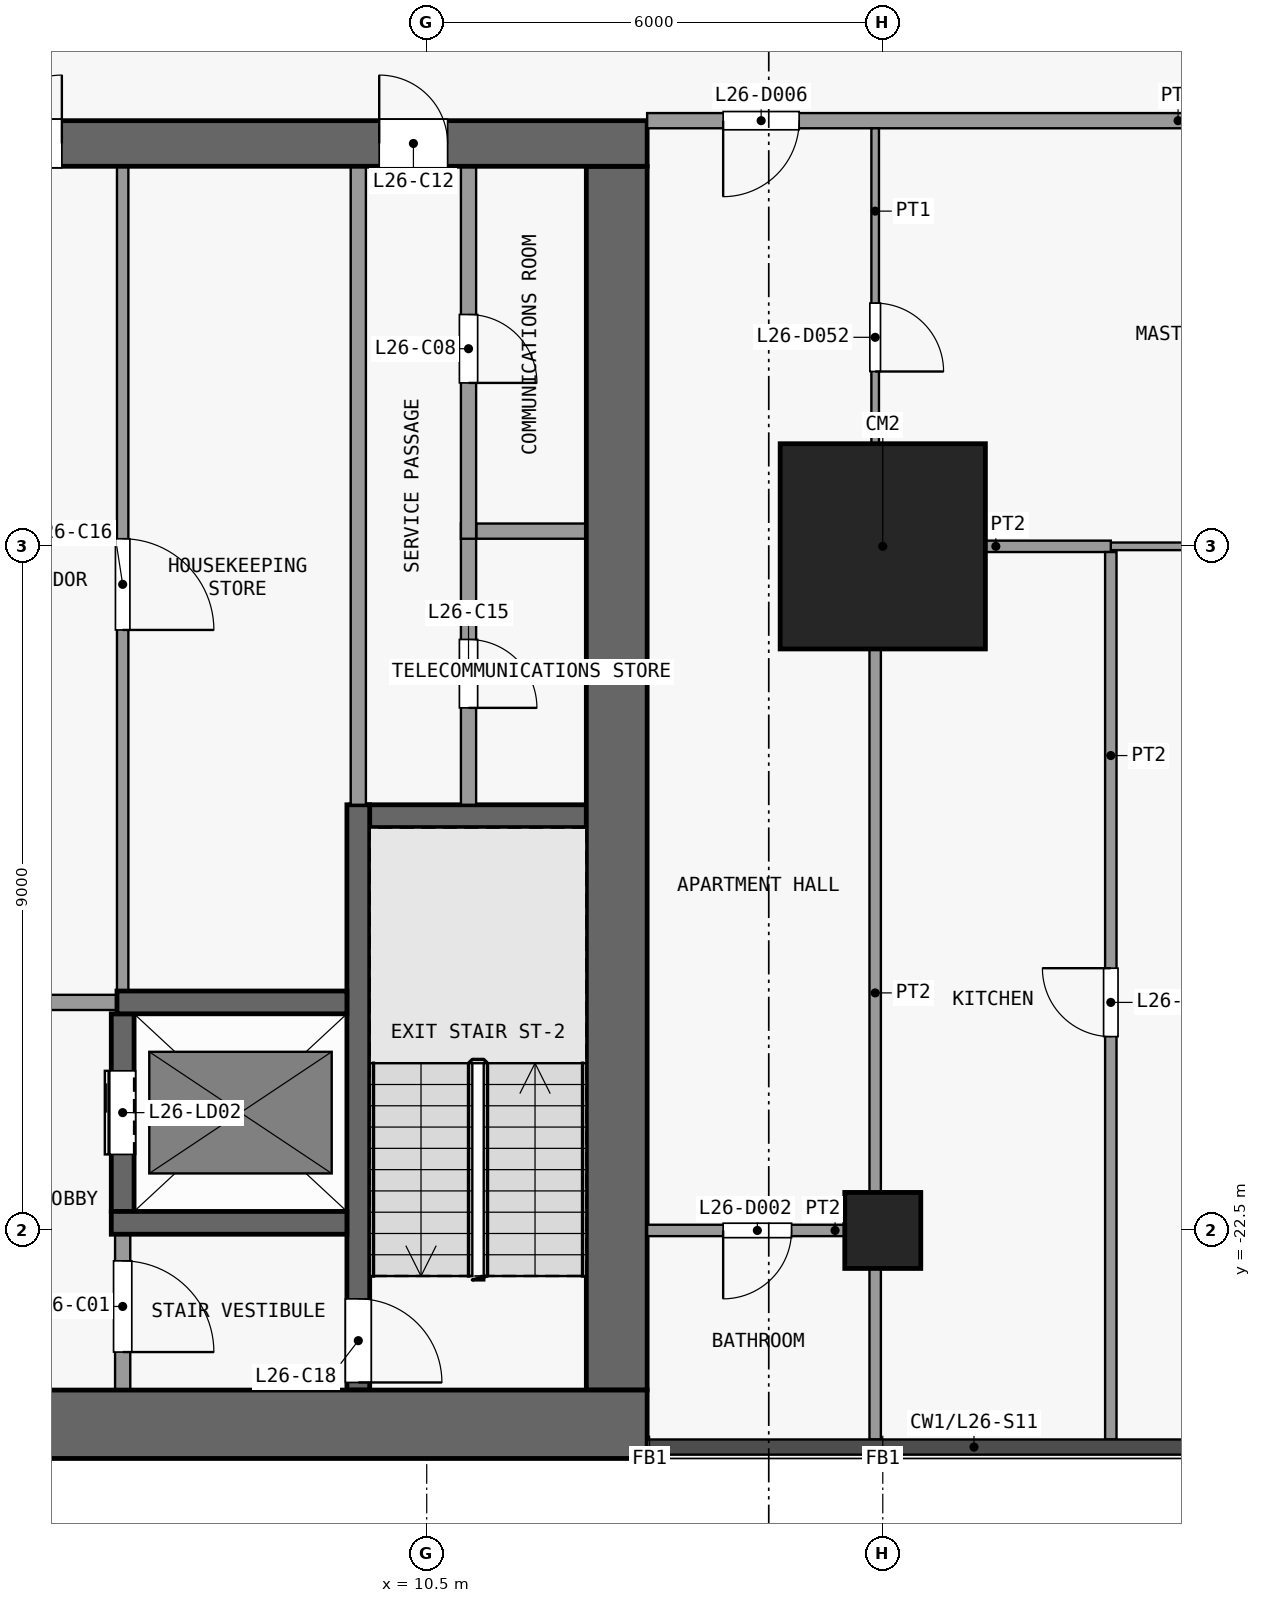
"""IFC4 building model, lengths in metres.
Left out: names, types, materials, properties, quantities, classifications, styles, units other than length and angle.
Written with IfcOpenShell. Run it as: python <this file> out.ifc"""

import sys

from ifc_helpers import new_model, si_unit, direction, frame, frame_2d, origin, origin_2d, place, context, subcontext, project, spatial, rectangle, extrude, element, fill, save


model = new_model("IFC4")
c1 = context("Model", 3, precision=1e-05, world=origin(), true_north=direction((0.0, 1.0)))
c2 = subcontext(c1, "Body", "Model", "MODEL_VIEW")
j1 = project(units=[si_unit("LENGTHUNIT", "METRE"), si_unit("PLANEANGLEUNIT", "RADIAN")], contexts=[c1])
p1 = place(None, origin())
s1 = spatial("IfcSite", under=j1, at=p1, CompositionType="ELEMENT")
p2 = place(p1, origin())
s2 = spatial("IfcBuilding", under=s1, at=p2, CompositionType="ELEMENT")
p3 = place(p2, frame((0.0, 0.0, 106.3)))
s3 = spatial("IfcBuildingStorey", under=s2, at=p3, CompositionType="ELEMENT", Elevation=106.3)
p4 = place(p3, frame((16.5, -22.5, 0.0), z_axis=(0.0, 0.0, 1.0), x_axis=(1.0, 0.0, 0.0)))
e1 = element("IfcColumn", 1, at=p4, inside=s3, PredefinedType="COLUMN", context=c2, shape_type="SweptSolid", body=[
    extrude(rectangle(XDim=1.0, YDim=1.0, at=origin_2d()), origin(), (0.0, 0.0, 1.0), 3.6),
])
p5 = place(p3, frame((16.5, -13.5, 0.0), z_axis=(0.0, 0.0, 1.0), x_axis=(1.0, 0.0, 0.0)))
e2 = element("IfcColumn", 2, at=p5, inside=s3, PredefinedType="COLUMN", context=c2, shape_type="SweptSolid", body=[
    extrude(rectangle(XDim=2.7, YDim=2.7, at=origin_2d()), origin(), (0.0, 0.0, 1.0), 3.6),
])
p6 = place(p3, frame((-13.4, -25.05, 0.0), z_axis=(0.0, 0.0, 1.0), x_axis=(1.0, 0.0, 0.0)))
e3 = element("IfcWall", 3, at=p6, inside=s3, PredefinedType="SHEAR", context=c2, shape_type="SweptSolid", body=[
    extrude(rectangle(XDim=26.8, YDim=0.9, at=frame_2d((13.4, 0.0))), origin(), (0.0, 0.0, 1.0), 3.3),
])
p7 = place(p3, frame((-13.4, -8.2, 0.0), z_axis=(0.0, 0.0, 1.0), x_axis=(1.0, 0.0, 0.0)))
e4 = element("IfcWall", 4, at=p7, inside=s3, PredefinedType="SHEAR", context=c2, shape_type="SweptSolid", body=[
    extrude(rectangle(XDim=26.8, YDim=0.6, at=frame_2d((13.4, 0.0))), origin(), (0.0, 0.0, 1.0), 3.3),
])
p8 = place(p7, frame((7.7, 0.0, 0.0)))
e5 = element("IfcOpeningElement", 5, at=p8, cuts=e4, PredefinedType="OPENING", context=c2, shape_type="SweptSolid", body=[
    extrude(rectangle(XDim=1.8, YDim=2.1, at=frame_2d((0.9, 1.05))), frame((0.0, 0.31, 0.0), z_axis=(0.0, -1.0, 0.0), x_axis=(1.0, 0.0, 0.0)), (0.0, 0.0, 1.0), 0.62),
])
p9 = place(p7, frame((17.3, 0.0, 0.0)))
e6 = element("IfcOpeningElement", 6, at=p9, cuts=e4, PredefinedType="OPENING", context=c2, shape_type="SweptSolid", body=[
    extrude(rectangle(XDim=1.8, YDim=2.1, at=frame_2d((0.9, 1.05))), frame((0.0, 0.31, 0.0), z_axis=(0.0, -1.0, 0.0), x_axis=(1.0, 0.0, 0.0)), (0.0, 0.0, 1.0), 0.62),
])
p10 = place(p7, frame((2.625, 0.0, 0.0)))
e7 = element("IfcOpeningElement", 7, at=p10, cuts=e4, PredefinedType="OPENING", context=c2, shape_type="SweptSolid", body=[
    extrude(rectangle(XDim=0.9, YDim=2.1, at=frame_2d((0.45, 1.05))), frame((0.0, 0.31, 0.0), z_axis=(0.0, -1.0, 0.0), x_axis=(1.0, 0.0, 0.0)), (0.0, 0.0, 1.0), 0.62),
])
p11 = place(p7, frame((23.275, 0.0, 0.0)))
e8 = element("IfcOpeningElement", 8, at=p11, cuts=e4, PredefinedType="OPENING", context=c2, shape_type="SweptSolid", body=[
    extrude(rectangle(XDim=0.9, YDim=2.1, at=frame_2d((0.45, 1.05))), frame((0.0, 0.31, 0.0), z_axis=(0.0, -1.0, 0.0), x_axis=(1.0, 0.0, 0.0)), (0.0, 0.0, 1.0), 0.62),
])
p12 = place(p3, frame((13.0, -24.6, 0.0), z_axis=(0.0, 0.0, 1.0), x_axis=(0.0, 1.0, 0.0)))
e9 = element("IfcWall", 9, at=p12, inside=s3, PredefinedType="SHEAR", context=c2, shape_type="SweptSolid", body=[
    extrude(rectangle(XDim=16.1, YDim=0.8, at=frame_2d((8.05, 0.0))), origin(), (0.0, 0.0, 1.0), 3.3),
])
p13 = place(p3, frame((6.35, -22.4, 0.0), z_axis=(0.0, 0.0, 1.0), x_axis=(1.0, 0.0, 0.0)))
e10 = element("IfcWall", 10, at=p13, inside=s3, PredefinedType="SHEAR", context=c2, shape_type="SweptSolid", body=[
    extrude(rectangle(XDim=3.1, YDim=0.3, at=frame_2d((1.55, 0.0))), origin(), (0.0, 0.0, 1.0), 3.3),
])
p14 = place(p3, frame((6.575, -19.5, 0.0), z_axis=(0.0, 0.0, 1.0), x_axis=(-1.0, 0.0, 0.0)))
e11 = element("IfcWall", 11, at=p14, inside=s3, PredefinedType="PARTITIONING", context=c2, shape_type="SweptSolid", body=[
    extrude(rectangle(XDim=3.375, YDim=0.2, at=frame_2d((1.688, 0.0))), origin(), (0.0, 0.0, 1.0), 3.3),
])
p15 = place(p14, frame((1.025, 0.0, 0.0)))
e12 = element("IfcOpeningElement", 12, at=p15, cuts=e11, PredefinedType="OPENING", context=c2, shape_type="SweptSolid", body=[
    extrude(rectangle(XDim=1.5, YDim=2.1, at=frame_2d((0.75, 1.05))), frame((0.0, 0.11, 0.0), z_axis=(0.0, -1.0, 0.0), x_axis=(1.0, 0.0, 0.0)), (0.0, 0.0, 1.0), 0.22),
])
p16 = place(p3, frame((6.425, -19.5, 0.0), z_axis=(0.0, 0.0, 1.0), x_axis=(1.0, 0.0, 0.0)))
e13 = element("IfcWall", 13, at=p16, inside=s3, PredefinedType="SHEAR", context=c2, shape_type="SweptSolid", body=[
    extrude(rectangle(XDim=3.025, YDim=0.3, at=frame_2d((1.512, 0.0))), origin(), (0.0, 0.0, 1.0), 3.3),
])
p17 = place(p3, frame((9.5, -17.05, 0.0), z_axis=(0.0, 0.0, 1.0), x_axis=(1.0, 0.0, 0.0)))
e14 = element("IfcWall", 14, at=p17, inside=s3, PredefinedType="SHEAR", context=c2, shape_type="SweptSolid", body=[
    extrude(rectangle(XDim=3.1, YDim=0.3, at=frame_2d((1.55, 0.0))), origin(), (0.0, 0.0, 1.0), 3.3),
])
p18 = place(p3, frame((11.15, -13.3, 0.0), z_axis=(0.0, 0.0, 1.0), x_axis=(1.0, 0.0, 0.0)))
e15 = element("IfcWall", 15, at=p18, inside=s3, PredefinedType="PARTITIONING", context=c2, shape_type="SweptSolid", body=[
    extrude(rectangle(XDim=1.45, YDim=0.2, at=frame_2d((0.725, 0.0))), origin(), (0.0, 0.0, 1.0), 3.3),
])
p19 = place(p3, frame((6.5, -22.55, 0.0), z_axis=(0.0, 0.0, 1.0), x_axis=(0.0, -1.0, 0.0)))
e16 = element("IfcWall", 16, at=p19, inside=s3, PredefinedType="PARTITIONING", context=c2, shape_type="SweptSolid", body=[
    extrude(rectangle(XDim=2.05, YDim=0.2, at=frame_2d((1.025, 0.0))), origin(), (0.0, 0.0, 1.0), 3.3),
])
p20 = place(p19, frame((0.35, 0.0, 0.0)))
e17 = element("IfcOpeningElement", 17, at=p20, cuts=e16, PredefinedType="OPENING", context=c2, shape_type="SweptSolid", body=[
    extrude(rectangle(XDim=1.2, YDim=2.1, at=frame_2d((0.6, 1.05))), frame((0.0, 0.11, 0.0), z_axis=(0.0, -1.0, 0.0), x_axis=(1.0, 0.0, 0.0)), (0.0, 0.0, 1.0), 0.22),
])
p21 = place(p3, frame((6.5, -22.25, 0.0), z_axis=(0.0, 0.0, 1.0), x_axis=(0.0, 1.0, 0.0)))
e18 = element("IfcWall", 18, at=p21, inside=s3, PredefinedType="SHEAR", context=c2, shape_type="SweptSolid", body=[
    extrude(rectangle(XDim=2.6, YDim=0.3, at=frame_2d((1.3, 0.0))), origin(), (0.0, 0.0, 1.0), 3.3),
])
p22 = place(p21, frame((0.75, 0.0, 0.0)))
e19 = element("IfcOpeningElement", 19, at=p22, cuts=e18, PredefinedType="OPENING", context=c2, shape_type="SweptSolid", body=[
    extrude(rectangle(XDim=1.1, YDim=2.1, at=frame_2d((0.55, 1.05))), frame((0.0, 0.16, 0.0), z_axis=(0.0, -1.0, 0.0), x_axis=(1.0, 0.0, 0.0)), (0.0, 0.0, 1.0), 0.32),
])
p23 = place(p3, frame((6.5, -8.5, 0.0), z_axis=(0.0, 0.0, 1.0), x_axis=(0.0, -1.0, 0.0)))
e20 = element("IfcWall", 20, at=p23, inside=s3, PredefinedType="PARTITIONING", context=c2, shape_type="SweptSolid", body=[
    extrude(rectangle(XDim=10.85, YDim=0.15, at=frame_2d((5.425, 0.0))), origin(), (0.0, 0.0, 1.0), 3.3),
])
p24 = place(p23, frame((4.9, 0.0, 0.0)))
e21 = element("IfcOpeningElement", 21, at=p24, cuts=e20, PredefinedType="OPENING", context=c2, shape_type="SweptSolid", body=[
    extrude(rectangle(XDim=1.2, YDim=2.1, at=frame_2d((0.6, 1.05))), frame((0.0, 0.085, 0.0), z_axis=(0.0, -1.0, 0.0), x_axis=(1.0, 0.0, 0.0)), (0.0, 0.0, 1.0), 0.17),
])
p25 = place(p3, frame((9.6, -16.9, 0.0), z_axis=(0.0, 0.0, 1.0), x_axis=(0.0, -1.0, 0.0)))
e22 = element("IfcWall", 22, at=p25, inside=s3, PredefinedType="SHEAR", context=c2, shape_type="SweptSolid", body=[
    extrude(rectangle(XDim=7.7, YDim=0.3, at=frame_2d((3.85, 0.0))), origin(), (0.0, 0.0, 1.0), 3.3),
])
p26 = place(p25, frame((6.5, 0.0, 0.0)))
e23 = element("IfcOpeningElement", 23, at=p26, cuts=e22, PredefinedType="OPENING", context=c2, shape_type="SweptSolid", body=[
    extrude(rectangle(XDim=1.1, YDim=2.1, at=frame_2d((0.55, 1.05))), frame((0.0, 0.16, 0.0), z_axis=(0.0, -1.0, 0.0), x_axis=(1.0, 0.0, 0.0)), (0.0, 0.0, 1.0), 0.32),
])
p27 = place(p3, frame((9.6, -16.9, 0.0), z_axis=(0.0, 0.0, 1.0), x_axis=(0.0, 1.0, 0.0)))
e24 = element("IfcWall", 24, at=p27, inside=s3, PredefinedType="PARTITIONING", context=c2, shape_type="SweptSolid", body=[
    extrude(rectangle(XDim=8.4, YDim=0.2, at=frame_2d((4.2, 0.0))), origin(), (0.0, 0.0, 1.0), 3.3),
])
p28 = place(p3, frame((11.05, -13.2, 0.0), z_axis=(0.0, 0.0, 1.0), x_axis=(0.0, -1.0, 0.0)))
e25 = element("IfcWall", 25, at=p28, inside=s3, PredefinedType="PARTITIONING", context=c2, shape_type="SweptSolid", body=[
    extrude(rectangle(XDim=3.7, YDim=0.2, at=frame_2d((1.85, 0.0))), origin(), (0.0, 0.0, 1.0), 3.3),
])
p29 = place(p28, frame((1.525, 0.0, 0.0)))
e26 = element("IfcOpeningElement", 26, at=p29, cuts=e25, PredefinedType="OPENING", context=c2, shape_type="SweptSolid", body=[
    extrude(rectangle(XDim=0.9, YDim=2.1, at=frame_2d((0.45, 1.05))), frame((0.0, 0.11, 0.0), z_axis=(0.0, -1.0, 0.0), x_axis=(1.0, 0.0, 0.0)), (0.0, 0.0, 1.0), 0.22),
])
p30 = place(p3, frame((11.05, -8.5, 0.0), z_axis=(0.0, 0.0, 1.0), x_axis=(0.0, -1.0, 0.0)))
e27 = element("IfcWall", 27, at=p30, inside=s3, PredefinedType="PARTITIONING", context=c2, shape_type="SweptSolid", body=[
    extrude(rectangle(XDim=4.9, YDim=0.2, at=frame_2d((2.45, 0.0))), origin(), (0.0, 0.0, 1.0), 3.3),
])
p31 = place(p30, frame((1.95, 0.0, 0.0)))
e28 = element("IfcOpeningElement", 28, at=p31, cuts=e27, PredefinedType="OPENING", context=c2, shape_type="SweptSolid", body=[
    extrude(rectangle(XDim=0.9, YDim=2.1, at=frame_2d((0.45, 1.05))), frame((0.0, 0.11, 0.0), z_axis=(0.0, -1.0, 0.0), x_axis=(1.0, 0.0, 0.0)), (0.0, 0.0, 1.0), 0.22),
])
p32 = place(p3, frame((13.4, -22.5, 0.0), z_axis=(0.0, 0.0, 1.0), x_axis=(1.0, 0.0, 0.0)))
e29 = element("IfcWall", 29, at=p32, inside=s3, PredefinedType="PARTITIONING", context=c2, shape_type="SweptSolid", body=[
    extrude(rectangle(XDim=2.925, YDim=0.15, at=frame_2d((1.462, 0.0))), origin(), (0.0, 0.0, 1.0), 3.3),
])
p33 = place(p32, frame((1.0, 0.0, 0.0)))
e30 = element("IfcOpeningElement", 30, at=p33, cuts=e29, PredefinedType="OPENING", context=c2, shape_type="SweptSolid", body=[
    extrude(rectangle(XDim=0.9, YDim=2.1, at=frame_2d((0.45, 1.05))), frame((0.0, 0.085, 0.0), z_axis=(0.0, -1.0, 0.0), x_axis=(1.0, 0.0, 0.0)), (0.0, 0.0, 1.0), 0.17),
])
p34 = place(p3, frame((19.5, -13.5, 0.0), z_axis=(0.0, 0.0, 1.0), x_axis=(1.0, 0.0, 0.0)))
e31 = element("IfcWall", 31, at=p34, inside=s3, PredefinedType="PARTITIONING", context=c2, shape_type="SweptSolid", body=[
    extrude(rectangle(XDim=5.75, YDim=0.1, at=frame_2d((2.875, 0.0))), origin(), (0.0, 0.0, 1.0), 3.3),
])
p35 = place(p34, frame((1.5, 0.0, 0.0)))
e32 = element("IfcOpeningElement", 32, at=p35, cuts=e31, PredefinedType="OPENING", context=c2, shape_type="SweptSolid", body=[
    extrude(rectangle(XDim=0.9, YDim=2.1, at=frame_2d((0.45, 1.05))), frame((0.0, 0.06, 0.0), z_axis=(0.0, -1.0, 0.0), x_axis=(1.0, 0.0, 0.0)), (0.0, 0.0, 1.0), 0.12),
])
p36 = place(p3, frame((16.475, -13.5, 0.0), z_axis=(0.0, 0.0, 1.0), x_axis=(1.0, 0.0, 0.0)))
e33 = element("IfcWall", 33, at=p36, inside=s3, PredefinedType="PARTITIONING", context=c2, shape_type="SweptSolid", body=[
    extrude(rectangle(XDim=3.025, YDim=0.15, at=frame_2d((1.512, 0.0))), origin(), (0.0, 0.0, 1.0), 3.3),
])
p37 = place(p3, frame((13.4, -7.9, 0.0), z_axis=(0.0, 0.0, 1.0), x_axis=(1.0, 0.0, 0.0)))
e34 = element("IfcWall", 34, at=p37, inside=s3, PredefinedType="PARTITIONING", context=c2, shape_type="SweptSolid", body=[
    extrude(rectangle(XDim=11.85, YDim=0.2, at=frame_2d((5.925, 0.0))), origin(), (0.0, 0.0, 1.0), 3.3),
])
p38 = place(p37, frame((1.0, 0.0, 0.0)))
e35 = element("IfcOpeningElement", 35, at=p38, cuts=e34, PredefinedType="OPENING", context=c2, shape_type="SweptSolid", body=[
    extrude(rectangle(XDim=1.0, YDim=2.1, at=frame_2d((0.5, 1.05))), frame((0.0, 0.11, 0.0), z_axis=(0.0, -1.0, 0.0), x_axis=(1.0, 0.0, 0.0)), (0.0, 0.0, 1.0), 0.22),
])
p39 = place(p3, frame((16.4, -13.5, 0.0), z_axis=(0.0, 0.0, 1.0), x_axis=(0.0, 1.0, 0.0)))
e36 = element("IfcWall", 36, at=p39, inside=s3, PredefinedType="PARTITIONING", context=c2, shape_type="SweptSolid", body=[
    extrude(rectangle(XDim=5.5, YDim=0.1, at=frame_2d((2.75, 0.0))), origin(), (0.0, 0.0, 1.0), 3.3),
])
p40 = place(p39, frame((2.3, 0.0, 0.0)))
e37 = element("IfcOpeningElement", 37, at=p40, cuts=e36, PredefinedType="OPENING", context=c2, shape_type="SweptSolid", body=[
    extrude(rectangle(XDim=0.9, YDim=2.1, at=frame_2d((0.45, 1.05))), frame((0.0, 0.06, 0.0), z_axis=(0.0, -1.0, 0.0), x_axis=(1.0, 0.0, 0.0)), (0.0, 0.0, 1.0), 0.12),
])
p41 = place(p3, frame((16.4, -25.25, 0.0), z_axis=(0.0, 0.0, 1.0), x_axis=(0.0, 1.0, 0.0)))
e38 = element("IfcWall", 38, at=p41, inside=s3, PredefinedType="PARTITIONING", context=c2, shape_type="SweptSolid", body=[
    extrude(rectangle(XDim=11.75, YDim=0.15, at=frame_2d((5.875, 0.0))), origin(), (0.0, 0.0, 1.0), 3.3),
])
p42 = place(p3, frame((19.5, -25.25, 0.0), z_axis=(0.0, 0.0, 1.0), x_axis=(0.0, 1.0, 0.0)))
e39 = element("IfcWall", 39, at=p42, inside=s3, PredefinedType="PARTITIONING", context=c2, shape_type="SweptSolid", body=[
    extrude(rectangle(XDim=11.675, YDim=0.15, at=frame_2d((5.837, 0.0))), origin(), (0.0, 0.0, 1.0), 3.3),
])
p43 = place(p42, frame((5.3, 0.0, 0.0)))
e40 = element("IfcOpeningElement", 40, at=p43, cuts=e39, PredefinedType="OPENING", context=c2, shape_type="SweptSolid", body=[
    extrude(rectangle(XDim=0.9, YDim=2.1, at=frame_2d((0.45, 1.05))), frame((0.0, 0.085, 0.0), z_axis=(0.0, -1.0, 0.0), x_axis=(1.0, 0.0, 0.0)), (0.0, 0.0, 1.0), 0.17),
])
p44 = place(p22, origin())
e41 = element("IfcDoor", 41, at=p44, inside=s3, OperationType="DOUBLE_DOOR_SLIDING", PredefinedType="DOOR", context=c2, shape_type="SweptSolid", body=[
    extrude(rectangle(XDim=1.1, YDim=2.1, at=frame_2d((0.55, 1.05))), frame((0.0, 0.025, 0.0), z_axis=(0.0, -1.0, 0.0), x_axis=(1.0, 0.0, 0.0)), (0.0, 0.0, 1.0), 0.05),
])
fill(e19, e41)
p45 = place(p20, origin())
e42 = element("IfcDoor", 42, at=p45, inside=s3, OperationType="SINGLE_SWING_RIGHT", PredefinedType="DOOR", context=c2, shape_type="SweptSolid", body=[
    extrude(rectangle(XDim=1.2, YDim=2.1, at=frame_2d((0.6, 1.05))), frame((0.0, 0.025, 0.0), z_axis=(0.0, -1.0, 0.0), x_axis=(1.0, 0.0, 0.0)), (0.0, 0.0, 1.0), 0.05),
])
fill(e17, e42)
p46 = place(p9, origin())
e43 = element("IfcDoor", 43, at=p46, inside=s3, OperationType="DOUBLE_DOOR_SINGLE_SWING", PredefinedType="DOOR", context=c2, shape_type="SweptSolid", body=[
    extrude(rectangle(XDim=1.8, YDim=2.1, at=frame_2d((0.9, 1.05))), frame((0.0, 0.025, 0.0), z_axis=(0.0, -1.0, 0.0), x_axis=(1.0, 0.0, 0.0)), (0.0, 0.0, 1.0), 0.05),
])
fill(e6, e43)
p47 = place(p31, origin())
e44 = element("IfcDoor", 44, at=p47, inside=s3, OperationType="SINGLE_SWING_RIGHT", PredefinedType="DOOR", context=c2, shape_type="SweptSolid", body=[
    extrude(rectangle(XDim=0.9, YDim=2.1, at=frame_2d((0.45, 1.05))), frame((0.0, 0.025, 0.0), z_axis=(0.0, -1.0, 0.0), x_axis=(1.0, 0.0, 0.0)), (0.0, 0.0, 1.0), 0.05),
])
fill(e28, e44)
p48 = place(p11, origin())
e45 = element("IfcDoor", 45, at=p48, inside=s3, OperationType="SINGLE_SWING_LEFT", PredefinedType="DOOR", context=c2, shape_type="SweptSolid", body=[
    extrude(rectangle(XDim=0.9, YDim=2.1, at=frame_2d((0.45, 1.05))), frame((0.0, 0.025, 0.0), z_axis=(0.0, -1.0, 0.0), x_axis=(1.0, 0.0, 0.0)), (0.0, 0.0, 1.0), 0.05),
])
fill(e8, e45)
p49 = place(p29, origin())
e46 = element("IfcDoor", 46, at=p49, inside=s3, OperationType="SINGLE_SWING_RIGHT", PredefinedType="DOOR", context=c2, shape_type="SweptSolid", body=[
    extrude(rectangle(XDim=0.9, YDim=2.1, at=frame_2d((0.45, 1.05))), frame((0.0, 0.025, 0.0), z_axis=(0.0, -1.0, 0.0), x_axis=(1.0, 0.0, 0.0)), (0.0, 0.0, 1.0), 0.05),
])
fill(e26, e46)
p50 = place(p24, origin())
e47 = element("IfcDoor", 47, at=p50, inside=s3, OperationType="SINGLE_SWING_RIGHT", PredefinedType="DOOR", context=c2, shape_type="SweptSolid", body=[
    extrude(rectangle(XDim=1.2, YDim=2.1, at=frame_2d((0.6, 1.05))), frame((0.0, 0.025, 0.0), z_axis=(0.0, -1.0, 0.0), x_axis=(1.0, 0.0, 0.0)), (0.0, 0.0, 1.0), 0.05),
])
fill(e21, e47)
p51 = place(p26, origin())
e48 = element("IfcDoor", 48, at=p51, inside=s3, OperationType="SINGLE_SWING_RIGHT", PredefinedType="DOOR", context=c2, shape_type="SweptSolid", body=[
    extrude(rectangle(XDim=1.1, YDim=2.1, at=frame_2d((0.55, 1.05))), frame((0.0, 0.025, 0.0), z_axis=(0.0, -1.0, 0.0), x_axis=(1.0, 0.0, 0.0)), (0.0, 0.0, 1.0), 0.05),
])
fill(e23, e48)
p52 = place(p33, origin())
e49 = element("IfcDoor", 49, at=p52, inside=s3, OperationType="SINGLE_SWING_LEFT", PredefinedType="DOOR", context=c2, shape_type="SweptSolid", body=[
    extrude(rectangle(XDim=0.9, YDim=2.1, at=frame_2d((0.45, 1.05))), frame((0.0, 0.025, 0.0), z_axis=(0.0, -1.0, 0.0), x_axis=(1.0, 0.0, 0.0)), (0.0, 0.0, 1.0), 0.05),
])
fill(e30, e49)
p53 = place(p38, origin())
e50 = element("IfcDoor", 50, at=p53, inside=s3, OperationType="SINGLE_SWING_LEFT", PredefinedType="DOOR", context=c2, shape_type="SweptSolid", body=[
    extrude(rectangle(XDim=1.0, YDim=2.1, at=frame_2d((0.5, 1.05))), frame((0.0, 0.025, 0.0), z_axis=(0.0, -1.0, 0.0), x_axis=(1.0, 0.0, 0.0)), (0.0, 0.0, 1.0), 0.05),
])
fill(e35, e50)
p54 = place(p40, origin())
e51 = element("IfcDoor", 51, at=p54, inside=s3, OperationType="SINGLE_SWING_LEFT", PredefinedType="DOOR", context=c2, shape_type="SweptSolid", body=[
    extrude(rectangle(XDim=0.9, YDim=2.1, at=frame_2d((0.45, 1.05))), frame((0.0, 0.025, 0.0), z_axis=(0.0, -1.0, 0.0), x_axis=(1.0, 0.0, 0.0)), (0.0, 0.0, 1.0), 0.05),
])
fill(e37, e51)
p55 = place(p43, origin())
e52 = element("IfcDoor", 52, at=p55, inside=s3, OperationType="SINGLE_SWING_LEFT", PredefinedType="DOOR", context=c2, shape_type="SweptSolid", body=[
    extrude(rectangle(XDim=0.9, YDim=2.1, at=frame_2d((0.45, 1.05))), frame((0.0, 0.025, 0.0), z_axis=(0.0, -1.0, 0.0), x_axis=(1.0, 0.0, 0.0)), (0.0, 0.0, 1.0), 0.05),
])
fill(e40, e52)
save(model, sys.argv[1])
